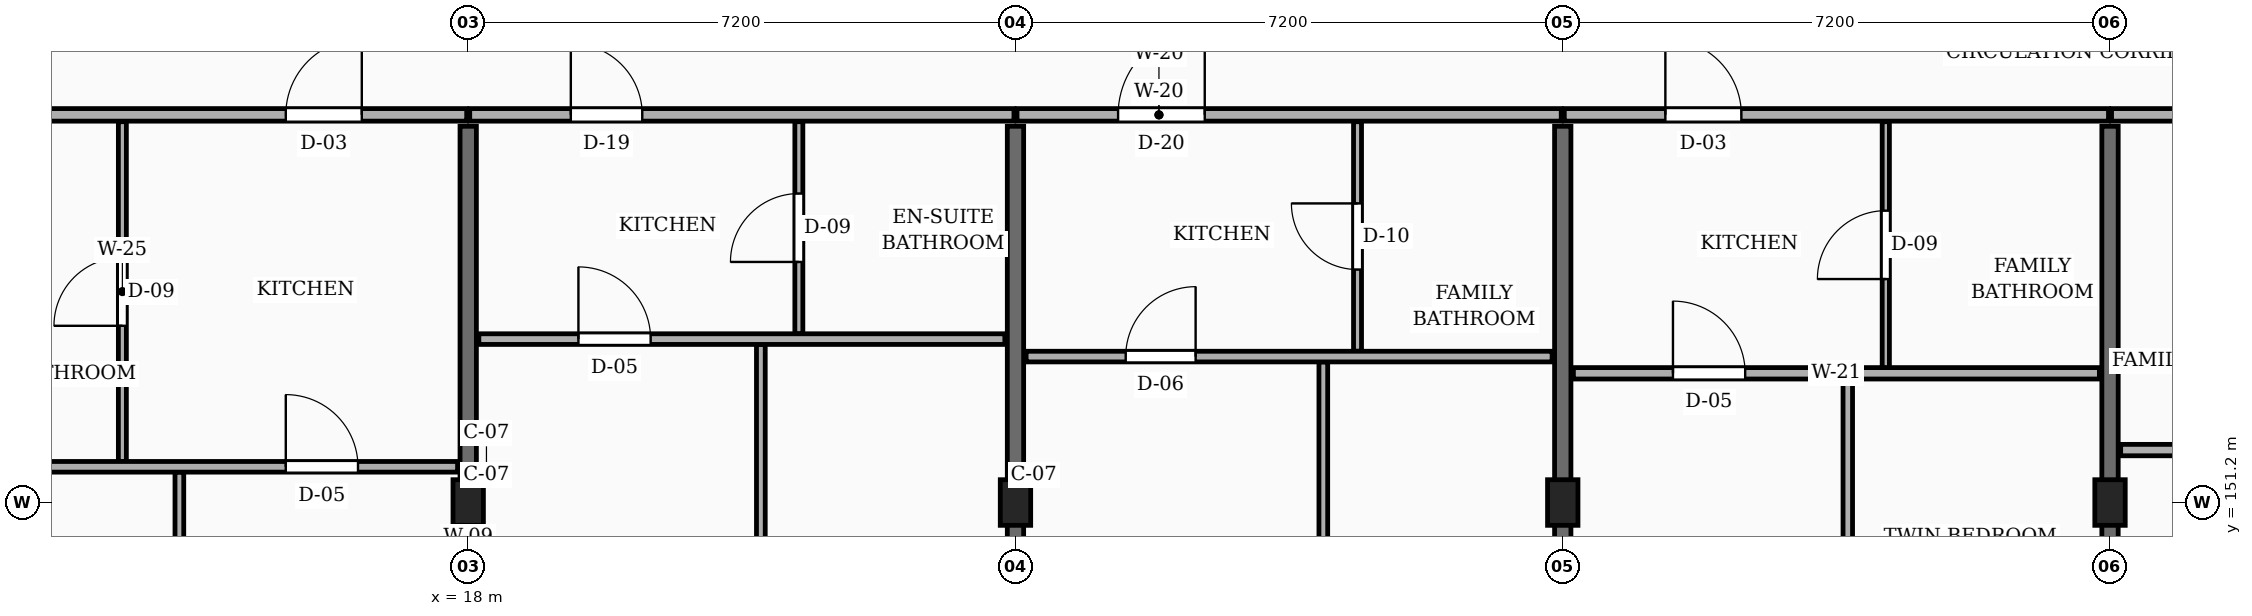
"""IFC4 building model, lengths in metres.
Left out: names, types, materials, properties, quantities, classifications, styles, units other than length and angle.
Written with IfcOpenShell. Run it as: python <this file> out.ifc"""

import sys

from ifc_helpers import new_model, si_unit, direction, frame, frame_2d, origin, origin_2d, place, context, subcontext, project, spatial, rectangle, extrude, element, fill, save


model = new_model("IFC4")
c1 = context("Model", 3, precision=1e-05, world=origin(), true_north=direction((0.0, 1.0)))
c2 = subcontext(c1, "Body", "Model", "MODEL_VIEW")
j1 = project(units=[si_unit("LENGTHUNIT", "METRE"), si_unit("PLANEANGLEUNIT", "RADIAN")], contexts=[c1])
p1 = place(None, origin())
s1 = spatial("IfcSite", under=j1, at=p1, CompositionType="ELEMENT")
p2 = place(p1, origin())
s2 = spatial("IfcBuilding", under=s1, at=p2, CompositionType="ELEMENT")
p3 = place(p2, frame((0.0, 0.0, 29.7)))
s3 = spatial("IfcBuildingStorey", under=s2, at=p3, CompositionType="ELEMENT", Elevation=29.7)
for number, where, z_axis, x_axis in (
    (1, (18.0, 151.2, 0.0), (0.0, 0.0, 1.0), (1.0, 0.0, 0.0)),
    (2, (25.2, 151.2, 0.0), (0.0, 0.0, 1.0), (1.0, 0.0, 0.0)),
    (3, (32.4, 151.2, 0.0), (0.0, 0.0, 1.0), (1.0, 0.0, 0.0)),
    (4, (39.6, 151.2, 0.0), (0.0, 0.0, 1.0), (1.0, 0.0, 0.0)),
):
    element("IfcColumn", number, at=place(p3, frame(where, z_axis=z_axis, x_axis=x_axis)), inside=s3, PredefinedType="COLUMN", context=c2, shape_type="SweptSolid", body=[
        extrude(rectangle(XDim=0.4, YDim=0.6, at=origin_2d()), origin(), (0.0, 0.0, 1.0), 3.15),
    ])
for number, where, z_axis, x_axis in (
    (5, (18.0, 144.25, 0.0), (0.0, 0.0, 1.0), (0.0, 1.0, 0.0)),
    (6, (25.2, 144.25, 0.0), (0.0, 0.0, 1.0), (0.0, 1.0, 0.0)),
    (7, (32.4, 144.25, 0.0), (0.0, 0.0, 1.0), (0.0, 1.0, 0.0)),
    (8, (39.6, 144.25, 0.0), (0.0, 0.0, 1.0), (0.0, 1.0, 0.0)),
):
    element("IfcWall", number, at=place(p3, frame(where, z_axis=z_axis, x_axis=x_axis)), inside=s3, PredefinedType="SOLIDWALL", context=c2, shape_type="SweptSolid", body=[
        extrude(rectangle(XDim=11.9, YDim=0.215, at=frame_2d((5.95, 0.0))), origin(), (0.0, 0.0, 1.0), 2.185),
    ])
p4 = place(p3, frame((10.975, 156.3, 0.0), z_axis=(0.0, 0.0, 1.0), x_axis=(1.0, 0.0, 0.0)))
e9 = element("IfcWall", 9, at=p4, inside=s3, PredefinedType="PARTITIONING", context=c2, shape_type="SweptSolid", body=[
    extrude(rectangle(XDim=7.005, YDim=0.165, at=frame_2d((3.502, 0.0))), origin(), (0.0, 0.0, 1.0), 2.32),
])
p5 = place(p4, frame((4.625, 0.0, 0.0)))
e10 = element("IfcOpeningElement", 10, at=p5, cuts=e9, PredefinedType="OPENING", context=c2, shape_type="SweptSolid", body=[
    extrude(rectangle(XDim=1.0, YDim=2.15, at=frame_2d((0.5, 1.075))), frame((0.0, 0.093, 0.0), z_axis=(0.0, -1.0, 0.0), x_axis=(1.0, 0.0, 0.0)), (0.0, 0.0, 1.0), 0.185),
])
p6 = place(p3, frame((18.02, 156.3, 0.0), z_axis=(0.0, 0.0, 1.0), x_axis=(1.0, 0.0, 0.0)))
e11 = element("IfcWall", 11, at=p6, inside=s3, PredefinedType="PARTITIONING", context=c2, shape_type="SweptSolid", body=[
    extrude(rectangle(XDim=7.16, YDim=0.165, at=frame_2d((3.58, 0.0))), origin(), (0.0, 0.0, 1.0), 2.32),
])
p7 = place(p6, frame((1.33, 0.0, 0.0)))
e12 = element("IfcOpeningElement", 12, at=p7, cuts=e11, PredefinedType="OPENING", context=c2, shape_type="SweptSolid", body=[
    extrude(rectangle(XDim=0.94, YDim=2.12, at=frame_2d((0.47, 1.06))), frame((0.0, 0.093, 0.0), z_axis=(0.0, -1.0, 0.0), x_axis=(1.0, 0.0, 0.0)), (0.0, 0.0, 1.0), 0.185),
])
p8 = place(p3, frame((25.22, 156.3, 0.0), z_axis=(0.0, 0.0, 1.0), x_axis=(1.0, 0.0, 0.0)))
e13 = element("IfcWall", 13, at=p8, inside=s3, PredefinedType="PARTITIONING", context=c2, shape_type="SweptSolid", body=[
    extrude(rectangle(XDim=7.16, YDim=0.165, at=frame_2d((3.58, 0.0))), origin(), (0.0, 0.0, 1.0), 2.32),
])
p9 = place(p8, frame((1.33, 0.0, 0.0)))
e14 = element("IfcOpeningElement", 14, at=p9, cuts=e13, PredefinedType="OPENING", context=c2, shape_type="SweptSolid", body=[
    extrude(rectangle(XDim=1.14, YDim=2.18, at=frame_2d((0.57, 1.09))), frame((0.0, 0.093, 0.0), z_axis=(0.0, -1.0, 0.0), x_axis=(1.0, 0.0, 0.0)), (0.0, 0.0, 1.0), 0.185),
])
p10 = place(p3, frame((32.42, 156.3, 0.0), z_axis=(0.0, 0.0, 1.0), x_axis=(1.0, 0.0, 0.0)))
e15 = element("IfcWall", 15, at=p10, inside=s3, PredefinedType="PARTITIONING", context=c2, shape_type="SweptSolid", body=[
    extrude(rectangle(XDim=7.16, YDim=0.165, at=frame_2d((3.58, 0.0))), origin(), (0.0, 0.0, 1.0), 2.32),
])
p11 = place(p10, frame((1.33, 0.0, 0.0)))
e16 = element("IfcOpeningElement", 16, at=p11, cuts=e15, PredefinedType="OPENING", context=c2, shape_type="SweptSolid", body=[
    extrude(rectangle(XDim=1.0, YDim=2.15, at=frame_2d((0.5, 1.075))), frame((0.0, 0.093, 0.0), z_axis=(0.0, -1.0, 0.0), x_axis=(1.0, 0.0, 0.0)), (0.0, 0.0, 1.0), 0.185),
])
p12 = place(p3, frame((39.62, 156.3, 0.0), z_axis=(0.0, 0.0, 1.0), x_axis=(1.0, 0.0, 0.0)))
e17 = element("IfcWall", 17, at=p12, inside=s3, PredefinedType="PARTITIONING", context=c2, shape_type="SweptSolid", body=[
    extrude(rectangle(XDim=7.16, YDim=0.165, at=frame_2d((3.58, 0.0))), origin(), (0.0, 0.0, 1.0), 2.32),
])
p13 = place(p12, frame((4.78, 0.0, 0.0)))
e18 = element("IfcOpeningElement", 18, at=p13, cuts=e17, PredefinedType="OPENING", context=c2, shape_type="SweptSolid", body=[
    extrude(rectangle(XDim=0.94, YDim=2.12, at=frame_2d((0.47, 1.06))), frame((0.0, 0.093, 0.0), z_axis=(0.0, -1.0, 0.0), x_axis=(1.0, 0.0, 0.0)), (0.0, 0.0, 1.0), 0.185),
])
p14 = place(p3, frame((14.2, 144.175, 0.0), z_axis=(0.0, 0.0, 1.0), x_axis=(0.0, 1.0, 0.0)))
e19 = element("IfcWall", 19, at=p14, inside=s3, PredefinedType="PARTITIONING", context=c2, shape_type="SweptSolid", body=[
    extrude(rectangle(XDim=7.425, YDim=0.115, at=frame_2d((3.712, 0.0))), origin(), (0.0, 0.0, 1.0), 2.32),
])
p15 = place(p14, frame((3.262, 0.0, 0.0)))
e20 = element("IfcOpeningElement", 20, at=p15, cuts=e19, PredefinedType="OPENING", context=c2, shape_type="SweptSolid", body=[
    extrude(rectangle(XDim=0.9, YDim=2.1, at=frame_2d((0.45, 1.05))), frame((0.0, 0.067, 0.0), z_axis=(0.0, -1.0, 0.0), x_axis=(1.0, 0.0, 0.0)), (0.0, 0.0, 1.0), 0.135),
])
p16 = place(p3, frame((13.45, 151.74, 0.0), z_axis=(0.0, 0.0, 1.0), x_axis=(0.0, 1.0, 0.0)))
e21 = element("IfcWall", 21, at=p16, inside=s3, PredefinedType="PARTITIONING", context=c2, shape_type="SweptSolid", body=[
    extrude(rectangle(XDim=4.47, YDim=0.105, at=frame_2d((2.235, 0.0))), origin(), (0.0, 0.0, 1.0), 2.32),
])
p17 = place(p16, frame((1.785, 0.0, 0.0)))
e22 = element("IfcOpeningElement", 22, at=p17, cuts=e21, PredefinedType="OPENING", context=c2, shape_type="SweptSolid", body=[
    extrude(rectangle(XDim=0.9, YDim=2.05, at=frame_2d((0.45, 1.025))), frame((0.0, 0.062, 0.0), z_axis=(0.0, -1.0, 0.0), x_axis=(1.0, 0.0, 0.0)), (0.0, 0.0, 1.0), 0.125),
])
p18 = place(p3, frame((10.975, 151.67, 0.0), z_axis=(0.0, 0.0, 1.0), x_axis=(1.0, 0.0, 0.0)))
e23 = element("IfcWall", 23, at=p18, inside=s3, PredefinedType="PARTITIONING", context=c2, shape_type="SweptSolid", body=[
    extrude(rectangle(XDim=6.885, YDim=0.14, at=frame_2d((3.442, 0.0))), origin(), (0.0, 0.0, 1.0), 2.32),
])
p19 = place(p18, frame((4.625, 0.0, 0.0)))
e24 = element("IfcOpeningElement", 24, at=p19, cuts=e23, PredefinedType="OPENING", context=c2, shape_type="SweptSolid", body=[
    extrude(rectangle(XDim=0.95, YDim=2.1, at=frame_2d((0.475, 1.05))), frame((0.0, 0.08, 0.0), z_axis=(0.0, -1.0, 0.0), x_axis=(1.0, 0.0, 0.0)), (0.0, 0.0, 1.0), 0.16),
])
p20 = place(p3, frame((21.85, 144.175, 0.0), z_axis=(0.0, 0.0, 1.0), x_axis=(0.0, 1.0, 0.0)))
e25 = element("IfcWall", 25, at=p20, inside=s3, PredefinedType="PARTITIONING", context=c2, shape_type="SweptSolid", body=[
    extrude(rectangle(XDim=9.105, YDim=0.115, at=frame_2d((4.552, 0.0))), origin(), (0.0, 0.0, 1.0), 2.32),
])
p21 = place(p20, frame((4.103, 0.0, 0.0)))
e26 = element("IfcOpeningElement", 26, at=p21, cuts=e25, PredefinedType="OPENING", context=c2, shape_type="SweptSolid", body=[
    extrude(rectangle(XDim=0.9, YDim=2.1, at=frame_2d((0.45, 1.05))), frame((0.0, 0.067, 0.0), z_axis=(0.0, -1.0, 0.0), x_axis=(1.0, 0.0, 0.0)), (0.0, 0.0, 1.0), 0.135),
])
p22 = place(p3, frame((22.35, 153.42, 0.0), z_axis=(0.0, 0.0, 1.0), x_axis=(0.0, 1.0, 0.0)))
e27 = element("IfcWall", 27, at=p22, inside=s3, PredefinedType="PARTITIONING", context=c2, shape_type="SweptSolid", body=[
    extrude(rectangle(XDim=2.79, YDim=0.105, at=frame_2d((1.395, 0.0))), origin(), (0.0, 0.0, 1.0), 2.32),
])
p23 = place(p22, frame((0.945, 0.0, 0.0)))
e28 = element("IfcOpeningElement", 28, at=p23, cuts=e27, PredefinedType="OPENING", context=c2, shape_type="SweptSolid", body=[
    extrude(rectangle(XDim=0.9, YDim=2.05, at=frame_2d((0.45, 1.025))), frame((0.0, 0.062, 0.0), z_axis=(0.0, -1.0, 0.0), x_axis=(1.0, 0.0, 0.0)), (0.0, 0.0, 1.0), 0.125),
])
p24 = place(p3, frame((18.14, 153.35, 0.0), z_axis=(0.0, 0.0, 1.0), x_axis=(1.0, 0.0, 0.0)))
e29 = element("IfcWall", 29, at=p24, inside=s3, PredefinedType="PARTITIONING", context=c2, shape_type="SweptSolid", body=[
    extrude(rectangle(XDim=6.92, YDim=0.14, at=frame_2d((3.46, 0.0))), origin(), (0.0, 0.0, 1.0), 2.32),
])
p25 = place(p24, frame((1.31, 0.0, 0.0)))
e30 = element("IfcOpeningElement", 30, at=p25, cuts=e29, PredefinedType="OPENING", context=c2, shape_type="SweptSolid", body=[
    extrude(rectangle(XDim=0.95, YDim=2.1, at=frame_2d((0.475, 1.05))), frame((0.0, 0.08, 0.0), z_axis=(0.0, -1.0, 0.0), x_axis=(1.0, 0.0, 0.0)), (0.0, 0.0, 1.0), 0.16),
])
p26 = place(p3, frame((29.25, 144.175, 0.0), z_axis=(0.0, 0.0, 1.0), x_axis=(0.0, 1.0, 0.0)))
e31 = element("IfcWall", 31, at=p26, inside=s3, PredefinedType="PARTITIONING", context=c2, shape_type="SweptSolid", body=[
    extrude(rectangle(XDim=8.875, YDim=0.115, at=frame_2d((4.438, 0.0))), origin(), (0.0, 0.0, 1.0), 2.32),
])
p27 = place(p26, frame((3.998, 0.0, 0.0)))
e32 = element("IfcOpeningElement", 32, at=p27, cuts=e31, PredefinedType="OPENING", context=c2, shape_type="SweptSolid", body=[
    extrude(rectangle(XDim=0.88, YDim=2.08, at=frame_2d((0.44, 1.04))), frame((0.0, 0.067, 0.0), z_axis=(0.0, -1.0, 0.0), x_axis=(1.0, 0.0, 0.0)), (0.0, 0.0, 1.0), 0.135),
])
p28 = place(p3, frame((29.7, 153.19, 0.0), z_axis=(0.0, 0.0, 1.0), x_axis=(0.0, 1.0, 0.0)))
e33 = element("IfcWall", 33, at=p28, inside=s3, PredefinedType="PARTITIONING", context=c2, shape_type="SweptSolid", body=[
    extrude(rectangle(XDim=3.02, YDim=0.105, at=frame_2d((1.51, 0.0))), origin(), (0.0, 0.0, 1.0), 2.32),
])
p29 = place(p28, frame((1.075, 0.0, 0.0)))
e34 = element("IfcOpeningElement", 34, at=p29, cuts=e33, PredefinedType="OPENING", context=c2, shape_type="SweptSolid", body=[
    extrude(rectangle(XDim=0.87, YDim=2.05, at=frame_2d((0.435, 1.025))), frame((0.0, 0.062, 0.0), z_axis=(0.0, -1.0, 0.0), x_axis=(1.0, 0.0, 0.0)), (0.0, 0.0, 1.0), 0.125),
])
p30 = place(p3, frame((25.34, 153.12, 0.0), z_axis=(0.0, 0.0, 1.0), x_axis=(1.0, 0.0, 0.0)))
e35 = element("IfcWall", 35, at=p30, inside=s3, PredefinedType="PARTITIONING", context=c2, shape_type="SweptSolid", body=[
    extrude(rectangle(XDim=6.92, YDim=0.14, at=frame_2d((3.46, 0.0))), origin(), (0.0, 0.0, 1.0), 2.32),
])
p31 = place(p30, frame((1.31, 0.0, 0.0)))
e36 = element("IfcOpeningElement", 36, at=p31, cuts=e35, PredefinedType="OPENING", context=c2, shape_type="SweptSolid", body=[
    extrude(rectangle(XDim=0.92, YDim=2.1, at=frame_2d((0.46, 1.05))), frame((0.0, 0.08, 0.0), z_axis=(0.0, -1.0, 0.0), x_axis=(1.0, 0.0, 0.0)), (0.0, 0.0, 1.0), 0.16),
])
p32 = place(p3, frame((36.15, 144.175, 0.0), z_axis=(0.0, 0.0, 1.0), x_axis=(0.0, 1.0, 0.0)))
e37 = element("IfcWall", 37, at=p32, inside=s3, PredefinedType="PARTITIONING", context=c2, shape_type="SweptSolid", body=[
    extrude(rectangle(XDim=8.655, YDim=0.125, at=frame_2d((4.328, 0.0))), origin(), (0.0, 0.0, 1.0), 2.32),
])
p33 = place(p32, frame((3.877, 0.0, 0.0)))
e38 = element("IfcOpeningElement", 38, at=p33, cuts=e37, PredefinedType="OPENING", context=c2, shape_type="SweptSolid", body=[
    extrude(rectangle(XDim=0.9, YDim=2.1, at=frame_2d((0.45, 1.05))), frame((0.0, 0.073, 0.0), z_axis=(0.0, -1.0, 0.0), x_axis=(1.0, 0.0, 0.0)), (0.0, 0.0, 1.0), 0.145),
])
p34 = place(p3, frame((36.65, 152.97, 0.0), z_axis=(0.0, 0.0, 1.0), x_axis=(0.0, 1.0, 0.0)))
e39 = element("IfcWall", 39, at=p34, inside=s3, PredefinedType="PARTITIONING", context=c2, shape_type="SweptSolid", body=[
    extrude(rectangle(XDim=3.24, YDim=0.095, at=frame_2d((1.62, 0.0))), origin(), (0.0, 0.0, 1.0), 2.32),
])
p35 = place(p34, frame((1.17, 0.0, 0.0)))
e40 = element("IfcOpeningElement", 40, at=p35, cuts=e39, PredefinedType="OPENING", context=c2, shape_type="SweptSolid", body=[
    extrude(rectangle(XDim=0.9, YDim=2.05, at=frame_2d((0.45, 1.025))), frame((0.0, 0.058, 0.0), z_axis=(0.0, -1.0, 0.0), x_axis=(1.0, 0.0, 0.0)), (0.0, 0.0, 1.0), 0.115),
])
p36 = place(p3, frame((32.54, 152.9, 0.0), z_axis=(0.0, 0.0, 1.0), x_axis=(1.0, 0.0, 0.0)))
e41 = element("IfcWall", 41, at=p36, inside=s3, PredefinedType="PARTITIONING", context=c2, shape_type="SweptSolid", body=[
    extrude(rectangle(XDim=6.92, YDim=0.15, at=frame_2d((3.46, 0.0))), origin(), (0.0, 0.0, 1.0), 2.32),
])
p37 = place(p36, frame((1.31, 0.0, 0.0)))
e42 = element("IfcOpeningElement", 42, at=p37, cuts=e41, PredefinedType="OPENING", context=c2, shape_type="SweptSolid", body=[
    extrude(rectangle(XDim=0.95, YDim=2.1, at=frame_2d((0.475, 1.05))), frame((0.0, 0.085, 0.0), z_axis=(0.0, -1.0, 0.0), x_axis=(1.0, 0.0, 0.0)), (0.0, 0.0, 1.0), 0.17),
])
p38 = place(p3, frame((39.74, 151.89, 0.0), z_axis=(0.0, 0.0, 1.0), x_axis=(1.0, 0.0, 0.0)))
e43 = element("IfcWall", 43, at=p38, inside=s3, PredefinedType="PARTITIONING", context=c2, shape_type="SweptSolid", body=[
    extrude(rectangle(XDim=6.92, YDim=0.15, at=frame_2d((3.46, 0.0))), origin(), (0.0, 0.0, 1.0), 2.32),
])
p39 = place(p38, frame((4.66, 0.0, 0.0)))
e44 = element("IfcOpeningElement", 44, at=p39, cuts=e43, PredefinedType="OPENING", context=c2, shape_type="SweptSolid", body=[
    extrude(rectangle(XDim=0.92, YDim=2.1, at=frame_2d((0.46, 1.05))), frame((0.0, 0.085, 0.0), z_axis=(0.0, -1.0, 0.0), x_axis=(1.0, 0.0, 0.0)), (0.0, 0.0, 1.0), 0.17),
])
p40 = place(p5, origin())
e45 = element("IfcDoor", 45, at=p40, inside=s3, OperationType="SINGLE_SWING_RIGHT", PredefinedType="DOOR", context=c2, shape_type="SweptSolid", body=[
    extrude(rectangle(XDim=1.0, YDim=2.15, at=frame_2d((0.5, 1.075))), frame((0.0, 0.025, 0.0), z_axis=(0.0, -1.0, 0.0), x_axis=(1.0, 0.0, 0.0)), (0.0, 0.0, 1.0), 0.05),
])
fill(e10, e45)
p41 = place(p7, origin())
e46 = element("IfcDoor", 46, at=p41, inside=s3, OperationType="SINGLE_SWING_LEFT", PredefinedType="DOOR", context=c2, shape_type="SweptSolid", body=[
    extrude(rectangle(XDim=0.94, YDim=2.12, at=frame_2d((0.47, 1.06))), frame((0.0, 0.025, 0.0), z_axis=(0.0, -1.0, 0.0), x_axis=(1.0, 0.0, 0.0)), (0.0, 0.0, 1.0), 0.05),
])
fill(e12, e46)
p42 = place(p9, origin())
e47 = element("IfcDoor", 47, at=p42, inside=s3, OperationType="SINGLE_SWING_RIGHT", PredefinedType="DOOR", context=c2, shape_type="SweptSolid", body=[
    extrude(rectangle(XDim=1.14, YDim=2.18, at=frame_2d((0.57, 1.09))), frame((0.0, 0.025, 0.0), z_axis=(0.0, -1.0, 0.0), x_axis=(1.0, 0.0, 0.0)), (0.0, 0.0, 1.0), 0.05),
])
fill(e14, e47)
p43 = place(p11, origin())
e48 = element("IfcDoor", 48, at=p43, inside=s3, OperationType="SINGLE_SWING_LEFT", PredefinedType="DOOR", context=c2, shape_type="SweptSolid", body=[
    extrude(rectangle(XDim=1.0, YDim=2.15, at=frame_2d((0.5, 1.075))), frame((0.0, 0.025, 0.0), z_axis=(0.0, -1.0, 0.0), x_axis=(1.0, 0.0, 0.0)), (0.0, 0.0, 1.0), 0.05),
])
fill(e16, e48)
p44 = place(p17, origin())
e49 = element("IfcDoor", 49, at=p44, inside=s3, OperationType="SINGLE_SWING_LEFT", PredefinedType="DOOR", context=c2, shape_type="SweptSolid", body=[
    extrude(rectangle(XDim=0.9, YDim=2.05, at=frame_2d((0.45, 1.025))), frame((0.0, 0.025, 0.0), z_axis=(0.0, -1.0, 0.0), x_axis=(1.0, 0.0, 0.0)), (0.0, 0.0, 1.0), 0.05),
])
fill(e22, e49)
p45 = place(p19, origin())
e50 = element("IfcDoor", 50, at=p45, inside=s3, OperationType="SINGLE_SWING_LEFT", PredefinedType="DOOR", context=c2, shape_type="SweptSolid", body=[
    extrude(rectangle(XDim=0.95, YDim=2.1, at=frame_2d((0.475, 1.05))), frame((0.0, 0.025, 0.0), z_axis=(0.0, -1.0, 0.0), x_axis=(1.0, 0.0, 0.0)), (0.0, 0.0, 1.0), 0.05),
])
fill(e24, e50)
p46 = place(p23, origin())
e51 = element("IfcDoor", 51, at=p46, inside=s3, OperationType="SINGLE_SWING_LEFT", PredefinedType="DOOR", context=c2, shape_type="SweptSolid", body=[
    extrude(rectangle(XDim=0.9, YDim=2.05, at=frame_2d((0.45, 1.025))), frame((0.0, 0.025, 0.0), z_axis=(0.0, -1.0, 0.0), x_axis=(1.0, 0.0, 0.0)), (0.0, 0.0, 1.0), 0.05),
])
fill(e28, e51)
p47 = place(p25, origin())
e52 = element("IfcDoor", 52, at=p47, inside=s3, OperationType="SINGLE_SWING_LEFT", PredefinedType="DOOR", context=c2, shape_type="SweptSolid", body=[
    extrude(rectangle(XDim=0.95, YDim=2.1, at=frame_2d((0.475, 1.05))), frame((0.0, 0.025, 0.0), z_axis=(0.0, -1.0, 0.0), x_axis=(1.0, 0.0, 0.0)), (0.0, 0.0, 1.0), 0.05),
])
fill(e30, e52)
p48 = place(p29, origin())
e53 = element("IfcDoor", 53, at=p48, inside=s3, OperationType="SINGLE_SWING_RIGHT", PredefinedType="DOOR", context=c2, shape_type="SweptSolid", body=[
    extrude(rectangle(XDim=0.87, YDim=2.05, at=frame_2d((0.435, 1.025))), frame((0.0, 0.025, 0.0), z_axis=(0.0, -1.0, 0.0), x_axis=(1.0, 0.0, 0.0)), (0.0, 0.0, 1.0), 0.05),
])
fill(e34, e53)
p49 = place(p31, origin())
e54 = element("IfcDoor", 54, at=p49, inside=s3, OperationType="SINGLE_SWING_RIGHT", PredefinedType="DOOR", context=c2, shape_type="SweptSolid", body=[
    extrude(rectangle(XDim=0.92, YDim=2.1, at=frame_2d((0.46, 1.05))), frame((0.0, 0.025, 0.0), z_axis=(0.0, -1.0, 0.0), x_axis=(1.0, 0.0, 0.0)), (0.0, 0.0, 1.0), 0.05),
])
fill(e36, e54)
p50 = place(p35, origin())
e55 = element("IfcDoor", 55, at=p50, inside=s3, OperationType="SINGLE_SWING_LEFT", PredefinedType="DOOR", context=c2, shape_type="SweptSolid", body=[
    extrude(rectangle(XDim=0.9, YDim=2.05, at=frame_2d((0.45, 1.025))), frame((0.0, 0.025, 0.0), z_axis=(0.0, -1.0, 0.0), x_axis=(1.0, 0.0, 0.0)), (0.0, 0.0, 1.0), 0.05),
])
fill(e40, e55)
p51 = place(p37, origin())
e56 = element("IfcDoor", 56, at=p51, inside=s3, OperationType="SINGLE_SWING_LEFT", PredefinedType="DOOR", context=c2, shape_type="SweptSolid", body=[
    extrude(rectangle(XDim=0.95, YDim=2.1, at=frame_2d((0.475, 1.05))), frame((0.0, 0.025, 0.0), z_axis=(0.0, -1.0, 0.0), x_axis=(1.0, 0.0, 0.0)), (0.0, 0.0, 1.0), 0.05),
])
fill(e42, e56)
save(model, sys.argv[1])
